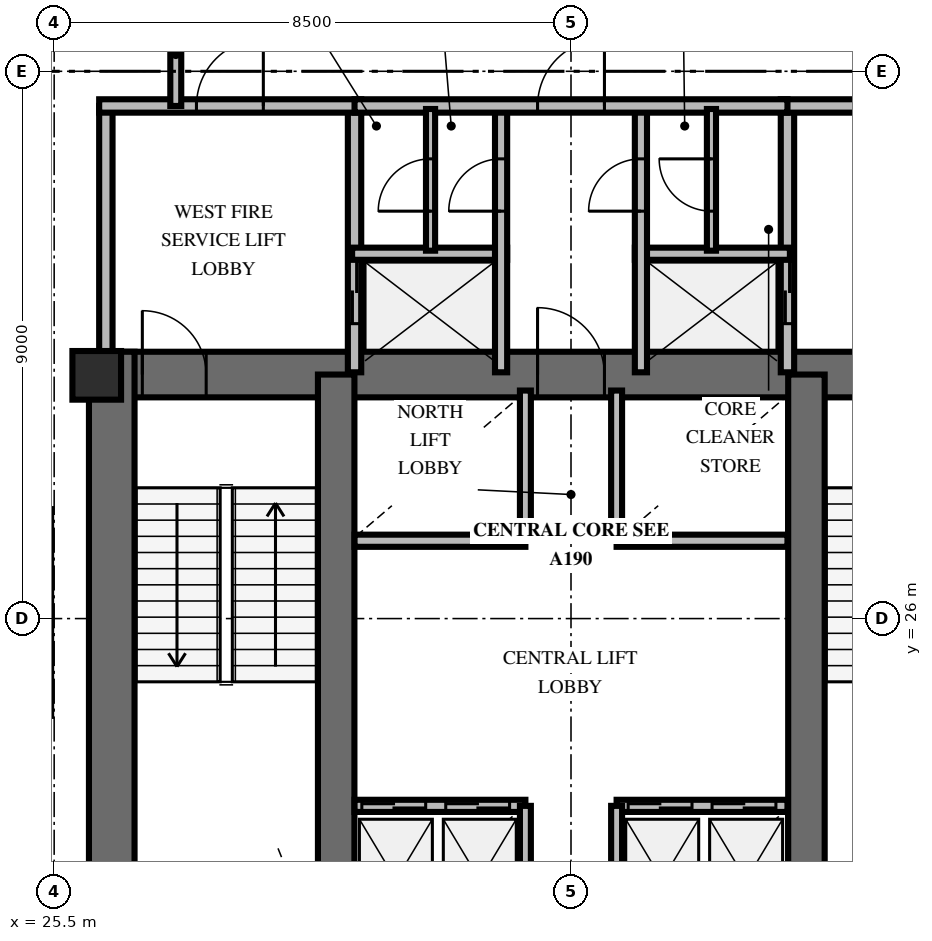
"""IFC4 building model, lengths in metres.
Left out: names, types, materials, properties, quantities, classifications, styles, units other than length and angle.
Written with IfcOpenShell. Run it as: python <this file> out.ifc"""

import sys

from ifc_helpers import new_model, si_unit, direction, frame, frame_2d, origin, origin_2d, place, context, subcontext, project, spatial, rectangle, extrude, element, fill, save


model = new_model("IFC4")
c1 = context("Model", 3, precision=1e-05, world=origin(), true_north=direction((0.0, 1.0)))
c2 = subcontext(c1, "Body", "Model", "MODEL_VIEW")
j1 = project(units=[si_unit("LENGTHUNIT", "METRE"), si_unit("PLANEANGLEUNIT", "RADIAN")], contexts=[c1])
p1 = place(None, origin())
s1 = spatial("IfcSite", under=j1, at=p1, CompositionType="ELEMENT")
p2 = place(p1, origin())
s2 = spatial("IfcBuilding", under=s1, at=p2, CompositionType="ELEMENT")
p3 = place(p2, frame((0.0, 0.0, 93.8)))
s3 = spatial("IfcBuildingStorey", under=s2, at=p3, CompositionType="ELEMENT", Elevation=93.8)
p4 = place(p3, frame((26.072, 30.013, 0.0), z_axis=(0.0, 0.0, 1.0), x_axis=(1.0, 0.0, 0.0)))
e1 = element("IfcWall", 1, at=p4, inside=s3, PredefinedType="SHEAR", context=c2, shape_type="SweptSolid", body=[
    extrude(rectangle(XDim=15.866, YDim=0.75, at=frame_2d((7.933, 0.0))), origin(), (0.0, 0.0, 1.0), 4.0),
])
p5 = place(p4, frame((0.878, 0.0, 0.0)))
e2 = element("IfcOpeningElement", 2, at=p5, cuts=e1, PredefinedType="OPENING", context=c2, shape_type="SweptSolid", body=[
    extrude(rectangle(XDim=1.05, YDim=2.15, at=frame_2d((0.525, 1.075))), frame((0.0, 0.385, 0.0), z_axis=(0.0, -1.0, 0.0), x_axis=(1.0, 0.0, 0.0)), (0.0, 0.0, 1.0), 0.77),
])
p6 = place(p4, frame((13.928, 0.0, 0.0)))
e3 = element("IfcOpeningElement", 3, at=p6, cuts=e1, PredefinedType="OPENING", context=c2, shape_type="SweptSolid", body=[
    extrude(rectangle(XDim=1.05, YDim=2.15, at=frame_2d((0.525, 1.075))), frame((0.0, 0.385, 0.0), z_axis=(0.0, -1.0, 0.0), x_axis=(1.0, 0.0, 0.0)), (0.0, 0.0, 1.0), 0.77),
])
p7 = place(p4, frame((7.378, 0.0, 0.0)))
e4 = element("IfcOpeningElement", 4, at=p7, cuts=e1, PredefinedType="OPENING", context=c2, shape_type="SweptSolid", body=[
    extrude(rectangle(XDim=1.1, YDim=2.15, at=frame_2d((0.55, 1.075))), frame((0.0, 0.385, 0.0), z_axis=(0.0, -1.0, 0.0), x_axis=(1.0, 0.0, 0.0)), (0.0, 0.0, 1.0), 0.77),
])
p8 = place(p3, frame((26.447, 19.812, 0.0), z_axis=(0.0, 0.0, 1.0), x_axis=(0.0, 1.0, 0.0)))
e5 = element("IfcWall", 5, at=p8, inside=s3, PredefinedType="SHEAR", context=c2, shape_type="SweptSolid", body=[
    extrude(rectangle(XDim=10.576, YDim=0.75, at=frame_2d((5.288, 0.0))), origin(), (0.0, 0.0, 1.0), 4.0),
])
for number, where, z_axis, x_axis in (
    (6, (30.138, 20.187, 0.0), (0.0, 0.0, 1.0), (0.0, 1.0, 0.0)),
    (7, (37.872, 20.187, 0.0), (0.0, 0.0, 1.0), (0.0, 1.0, 0.0)),
):
    element("IfcWall", number, at=place(p3, frame(where, z_axis=z_axis, x_axis=x_axis)), inside=s3, PredefinedType="SHEAR", context=c2, shape_type="SweptSolid", body=[
        extrude(rectangle(XDim=9.826, YDim=0.6, at=frame_2d((4.913, 0.0))), origin(), (0.0, 0.0, 1.0), 4.0),
    ])
p9 = place(p3, frame((26.2, 30.0, 0.0), z_axis=(0.0, 0.0, 1.0), x_axis=(1.0, 0.0, 0.0)))
e8 = element("IfcColumn", 8, at=p9, inside=s3, PredefinedType="PILASTER", context=c2, shape_type="SweptSolid", body=[
    extrude(rectangle(XDim=0.8, YDim=0.8, at=origin_2d()), origin(), (0.0, 0.0, 1.0), 4.0),
])
p10 = place(p3, frame((26.35, 30.05, 0.0), z_axis=(0.0, 0.0, 1.0), x_axis=(0.0, 1.0, 0.0)))
e9 = element("IfcWall", 9, at=p10, inside=s3, PredefinedType="SOLIDWALL", context=c2, shape_type="SweptSolid", body=[
    extrude(rectangle(XDim=4.38, YDim=0.22, at=frame_2d((2.19, 0.0))), origin(), (0.0, 0.0, 1.0), 2.8),
])
p11 = place(p3, frame((30.44, 30.05, 0.0), z_axis=(0.0, 0.0, 1.0), x_axis=(0.0, 1.0, 0.0)))
e10 = element("IfcWall", 10, at=p11, inside=s3, PredefinedType="SOLIDWALL", context=c2, shape_type="SweptSolid", body=[
    extrude(rectangle(XDim=4.38, YDim=0.22, at=frame_2d((2.19, 0.0))), origin(), (0.0, 0.0, 1.0), 2.8),
])
p12 = place(p11, frame((0.8, 0.0, 0.0)))
e11 = element("IfcOpeningElement", 11, at=p12, cuts=e10, PredefinedType="OPENING", context=c2, shape_type="SweptSolid", body=[
    extrude(rectangle(XDim=1.05, YDim=2.1, at=frame_2d((0.525, 1.05))), frame((0.0, 0.12, 0.0), z_axis=(0.0, -1.0, 0.0), x_axis=(1.0, 0.0, 0.0)), (0.0, 0.0, 1.0), 0.24),
])
p13 = place(p3, frame((26.24, 34.43, 0.0), z_axis=(0.0, 0.0, 1.0), x_axis=(1.0, 0.0, 0.0)))
e12 = element("IfcWall", 12, at=p13, inside=s3, PredefinedType="SOLIDWALL", context=c2, shape_type="SweptSolid", body=[
    extrude(rectangle(XDim=4.31, YDim=0.22, at=frame_2d((2.155, 0.0))), origin(), (0.0, 0.0, 1.0), 2.8),
])
p14 = place(p13, frame((1.6, 0.0, 0.0)))
e13 = element("IfcOpeningElement", 13, at=p14, cuts=e12, PredefinedType="OPENING", context=c2, shape_type="SweptSolid", body=[
    extrude(rectangle(XDim=1.1, YDim=2.15, at=frame_2d((0.55, 1.075))), frame((0.0, 0.12, 0.0), z_axis=(0.0, -1.0, 0.0), x_axis=(1.0, 0.0, 0.0)), (0.0, 0.0, 1.0), 0.24),
])
p15 = place(p3, frame((30.4, 32.0, 0.0), z_axis=(0.0, 0.0, 1.0), x_axis=(1.0, 0.0, 0.0)))
e14 = element("IfcWall", 14, at=p15, inside=s3, PredefinedType="SOLIDWALL", context=c2, shape_type="SweptSolid", body=[
    extrude(rectangle(XDim=2.55, YDim=0.2, at=frame_2d((1.275, 0.0))), origin(), (0.0, 0.0, 1.0), 2.8),
])
p16 = place(p3, frame((32.85, 30.05, 0.0), z_axis=(0.0, 0.0, 1.0), x_axis=(0.0, 1.0, 0.0)))
e15 = element("IfcWall", 15, at=p16, inside=s3, PredefinedType="SOLIDWALL", context=c2, shape_type="SweptSolid", body=[
    extrude(rectangle(XDim=4.38, YDim=0.2, at=frame_2d((2.19, 0.0))), origin(), (0.0, 0.0, 1.0), 2.8),
])
p17 = place(p16, frame((2.65, 0.0, 0.0)))
e16 = element("IfcOpeningElement", 16, at=p17, cuts=e15, PredefinedType="OPENING", context=c2, shape_type="SweptSolid", body=[
    extrude(rectangle(XDim=0.86, YDim=2.05, at=frame_2d((0.43, 1.025))), frame((0.0, 0.11, 0.0), z_axis=(0.0, -1.0, 0.0), x_axis=(1.0, 0.0, 0.0)), (0.0, 0.0, 1.0), 0.22),
])
p18 = place(p3, frame((37.56, 30.05, 0.0), z_axis=(0.0, 0.0, 1.0), x_axis=(0.0, 1.0, 0.0)))
e17 = element("IfcWall", 17, at=p18, inside=s3, PredefinedType="SOLIDWALL", context=c2, shape_type="SweptSolid", body=[
    extrude(rectangle(XDim=4.38, YDim=0.22, at=frame_2d((2.19, 0.0))), origin(), (0.0, 0.0, 1.0), 2.8),
])
p19 = place(p18, frame((0.8, 0.0, 0.0)))
e18 = element("IfcOpeningElement", 18, at=p19, cuts=e17, PredefinedType="OPENING", context=c2, shape_type="SweptSolid", body=[
    extrude(rectangle(XDim=1.05, YDim=2.1, at=frame_2d((0.525, 1.05))), frame((0.0, 0.12, 0.0), z_axis=(0.0, -1.0, 0.0), x_axis=(1.0, 0.0, 0.0)), (0.0, 0.0, 1.0), 0.24),
])
p20 = place(p3, frame((37.45, 34.43, 0.0), z_axis=(0.0, 0.0, 1.0), x_axis=(1.0, 0.0, 0.0)))
e19 = element("IfcWall", 19, at=p20, inside=s3, PredefinedType="SOLIDWALL", context=c2, shape_type="SweptSolid", body=[
    extrude(rectangle(XDim=4.31, YDim=0.22, at=frame_2d((2.155, 0.0))), origin(), (0.0, 0.0, 1.0), 2.8),
])
p21 = place(p20, frame((1.6, 0.0, 0.0)))
e20 = element("IfcOpeningElement", 20, at=p21, cuts=e19, PredefinedType="OPENING", context=c2, shape_type="SweptSolid", body=[
    extrude(rectangle(XDim=1.1, YDim=2.15, at=frame_2d((0.55, 1.075))), frame((0.0, 0.12, 0.0), z_axis=(0.0, -1.0, 0.0), x_axis=(1.0, 0.0, 0.0)), (0.0, 0.0, 1.0), 0.24),
])
p22 = place(p3, frame((35.05, 32.0, 0.0), z_axis=(0.0, 0.0, 1.0), x_axis=(1.0, 0.0, 0.0)))
e21 = element("IfcWall", 21, at=p22, inside=s3, PredefinedType="SOLIDWALL", context=c2, shape_type="SweptSolid", body=[
    extrude(rectangle(XDim=2.55, YDim=0.2, at=frame_2d((1.275, 0.0))), origin(), (0.0, 0.0, 1.0), 2.8),
])
p23 = place(p3, frame((35.15, 30.05, 0.0), z_axis=(0.0, 0.0, 1.0), x_axis=(0.0, 1.0, 0.0)))
e22 = element("IfcWall", 22, at=p23, inside=s3, PredefinedType="SOLIDWALL", context=c2, shape_type="SweptSolid", body=[
    extrude(rectangle(XDim=4.38, YDim=0.2, at=frame_2d((2.19, 0.0))), origin(), (0.0, 0.0, 1.0), 2.8),
])
p24 = place(p23, frame((2.65, 0.0, 0.0)))
e23 = element("IfcOpeningElement", 23, at=p24, cuts=e22, PredefinedType="OPENING", context=c2, shape_type="SweptSolid", body=[
    extrude(rectangle(XDim=0.86, YDim=2.05, at=frame_2d((0.43, 1.025))), frame((0.0, 0.11, 0.0), z_axis=(0.0, -1.0, 0.0), x_axis=(1.0, 0.0, 0.0)), (0.0, 0.0, 1.0), 0.22),
])
p25 = place(p3, frame((30.44, 34.43, 0.0), z_axis=(0.0, 0.0, 1.0), x_axis=(1.0, 0.0, 0.0)))
e24 = element("IfcWall", 24, at=p25, inside=s3, PredefinedType="SOLIDWALL", context=c2, shape_type="SweptSolid", body=[
    extrude(rectangle(XDim=7.12, YDim=0.22, at=frame_2d((3.56, 0.0))), origin(), (0.0, 0.0, 1.0), 2.8),
])
p26 = place(p25, frame((3.01, 0.0, 0.0)))
e25 = element("IfcOpeningElement", 25, at=p26, cuts=e24, PredefinedType="OPENING", context=c2, shape_type="SweptSolid", body=[
    extrude(rectangle(XDim=1.1, YDim=2.15, at=frame_2d((0.55, 1.075))), frame((0.0, 0.12, 0.0), z_axis=(0.0, -1.0, 0.0), x_axis=(1.0, 0.0, 0.0)), (0.0, 0.0, 1.0), 0.24),
])
p27 = place(p3, frame((31.69, 32.05, 0.0), z_axis=(0.0, 0.0, 1.0), x_axis=(0.0, 1.0, 0.0)))
e26 = element("IfcWall", 26, at=p27, inside=s3, PredefinedType="PARTITIONING", context=c2, shape_type="SweptSolid", body=[
    extrude(rectangle(XDim=2.33, YDim=0.15, at=frame_2d((1.165, 0.0))), origin(), (0.0, 0.0, 1.0), 2.8),
])
p28 = place(p27, frame((0.65, 0.0, 0.0)))
e27 = element("IfcOpeningElement", 27, at=p28, cuts=e26, PredefinedType="OPENING", context=c2, shape_type="SweptSolid", body=[
    extrude(rectangle(XDim=0.86, YDim=2.05, at=frame_2d((0.43, 1.025))), frame((0.0, 0.085, 0.0), z_axis=(0.0, -1.0, 0.0), x_axis=(1.0, 0.0, 0.0)), (0.0, 0.0, 1.0), 0.17),
])
p29 = place(p3, frame((36.31, 32.05, 0.0), z_axis=(0.0, 0.0, 1.0), x_axis=(0.0, 1.0, 0.0)))
e28 = element("IfcWall", 28, at=p29, inside=s3, PredefinedType="PARTITIONING", context=c2, shape_type="SweptSolid", body=[
    extrude(rectangle(XDim=2.33, YDim=0.15, at=frame_2d((1.165, 0.0))), origin(), (0.0, 0.0, 1.0), 2.8),
])
p30 = place(p29, frame((0.65, 0.0, 0.0)))
e29 = element("IfcOpeningElement", 29, at=p30, cuts=e28, PredefinedType="OPENING", context=c2, shape_type="SweptSolid", body=[
    extrude(rectangle(XDim=0.86, YDim=2.05, at=frame_2d((0.43, 1.025))), frame((0.0, 0.085, 0.0), z_axis=(0.0, -1.0, 0.0), x_axis=(1.0, 0.0, 0.0)), (0.0, 0.0, 1.0), 0.17),
])
p31 = place(p3, frame((30.44, 22.92, 0.0), z_axis=(0.0, 0.0, 1.0), x_axis=(1.0, 0.0, 0.0)))
e30 = element("IfcWall", 30, at=p31, inside=s3, PredefinedType="SOLIDWALL", context=c2, shape_type="SweptSolid", body=[
    extrude(rectangle(XDim=2.81, YDim=0.2, at=frame_2d((1.405, 0.0))), origin(), (0.0, 0.0, 1.0), 2.8),
])
p32 = place(p31, frame((0.12, 0.0, 0.0)))
e31 = element("IfcOpeningElement", 31, at=p32, cuts=e30, PredefinedType="OPENING", context=c2, shape_type="SweptSolid", body=[
    extrude(rectangle(XDim=1.05, YDim=2.1, at=frame_2d((0.525, 1.05))), frame((0.0, 0.11, 0.0), z_axis=(0.0, -1.0, 0.0), x_axis=(1.0, 0.0, 0.0)), (0.0, 0.0, 1.0), 0.22),
])
p33 = place(p31, frame((1.5, 0.0, 0.0)))
e32 = element("IfcOpeningElement", 32, at=p33, cuts=e30, PredefinedType="OPENING", context=c2, shape_type="SweptSolid", body=[
    extrude(rectangle(XDim=1.05, YDim=2.1, at=frame_2d((0.525, 1.05))), frame((0.0, 0.11, 0.0), z_axis=(0.0, -1.0, 0.0), x_axis=(1.0, 0.0, 0.0)), (0.0, 0.0, 1.0), 0.22),
])
p34 = place(p3, frame((33.25, 20.5, 0.0), z_axis=(0.0, 0.0, 1.0), x_axis=(0.0, 1.0, 0.0)))
e33 = element("IfcWall", 33, at=p34, inside=s3, PredefinedType="SOLIDWALL", context=c2, shape_type="SweptSolid", body=[
    extrude(rectangle(XDim=2.42, YDim=0.18, at=frame_2d((1.21, 0.0))), origin(), (0.0, 0.0, 1.0), 2.8),
])
p35 = place(p3, frame((34.75, 22.92, 0.0), z_axis=(0.0, 0.0, 1.0), x_axis=(1.0, 0.0, 0.0)))
e34 = element("IfcWall", 34, at=p35, inside=s3, PredefinedType="SOLIDWALL", context=c2, shape_type="SweptSolid", body=[
    extrude(rectangle(XDim=2.81, YDim=0.2, at=frame_2d((1.405, 0.0))), origin(), (0.0, 0.0, 1.0), 2.8),
])
p36 = place(p35, frame((0.19, 0.0, 0.0)))
e35 = element("IfcOpeningElement", 35, at=p36, cuts=e34, PredefinedType="OPENING", context=c2, shape_type="SweptSolid", body=[
    extrude(rectangle(XDim=1.05, YDim=2.1, at=frame_2d((0.525, 1.05))), frame((0.0, 0.11, 0.0), z_axis=(0.0, -1.0, 0.0), x_axis=(1.0, 0.0, 0.0)), (0.0, 0.0, 1.0), 0.22),
])
p37 = place(p35, frame((1.57, 0.0, 0.0)))
e36 = element("IfcOpeningElement", 36, at=p37, cuts=e34, PredefinedType="OPENING", context=c2, shape_type="SweptSolid", body=[
    extrude(rectangle(XDim=1.05, YDim=2.1, at=frame_2d((0.525, 1.05))), frame((0.0, 0.11, 0.0), z_axis=(0.0, -1.0, 0.0), x_axis=(1.0, 0.0, 0.0)), (0.0, 0.0, 1.0), 0.22),
])
p38 = place(p3, frame((34.75, 20.5, 0.0), z_axis=(0.0, 0.0, 1.0), x_axis=(0.0, 1.0, 0.0)))
e37 = element("IfcWall", 37, at=p38, inside=s3, PredefinedType="SOLIDWALL", context=c2, shape_type="SweptSolid", body=[
    extrude(rectangle(XDim=2.42, YDim=0.18, at=frame_2d((1.21, 0.0))), origin(), (0.0, 0.0, 1.0), 2.8),
])
p39 = place(p3, frame((30.44, 27.28, 0.0), z_axis=(0.0, 0.0, 1.0), x_axis=(1.0, 0.0, 0.0)))
e38 = element("IfcWall", 38, at=p39, inside=s3, PredefinedType="SOLIDWALL", context=c2, shape_type="SweptSolid", body=[
    extrude(rectangle(XDim=2.81, YDim=0.2, at=frame_2d((1.405, 0.0))), origin(), (0.0, 0.0, 1.0), 2.8),
])
p40 = place(p3, frame((33.25, 27.28, 0.0), z_axis=(0.0, 0.0, 1.0), x_axis=(0.0, 1.0, 0.0)))
e39 = element("IfcWall", 39, at=p40, inside=s3, PredefinedType="SOLIDWALL", context=c2, shape_type="SweptSolid", body=[
    extrude(rectangle(XDim=2.47, YDim=0.18, at=frame_2d((1.235, 0.0))), origin(), (0.0, 0.0, 1.0), 2.8),
])
p41 = place(p3, frame((34.75, 27.28, 0.0), z_axis=(0.0, 0.0, 1.0), x_axis=(1.0, 0.0, 0.0)))
e40 = element("IfcWall", 40, at=p41, inside=s3, PredefinedType="SOLIDWALL", context=c2, shape_type="SweptSolid", body=[
    extrude(rectangle(XDim=2.81, YDim=0.2, at=frame_2d((1.405, 0.0))), origin(), (0.0, 0.0, 1.0), 2.8),
])
p42 = place(p3, frame((34.75, 27.28, 0.0), z_axis=(0.0, 0.0, 1.0), x_axis=(0.0, 1.0, 0.0)))
e41 = element("IfcWall", 41, at=p42, inside=s3, PredefinedType="SOLIDWALL", context=c2, shape_type="SweptSolid", body=[
    extrude(rectangle(XDim=2.47, YDim=0.18, at=frame_2d((1.235, 0.0))), origin(), (0.0, 0.0, 1.0), 2.8),
])
p43 = place(p3, frame((27.5, 34.43, 0.0), z_axis=(0.0, 0.0, 1.0), x_axis=(0.0, 1.0, 0.0)))
e42 = element("IfcWall", 42, at=p43, inside=s3, PredefinedType="PARTITIONING", context=c2, shape_type="SweptSolid", body=[
    extrude(rectangle(XDim=1.693, YDim=0.18, at=frame_2d((0.846, 0.0))), origin(), (0.0, 0.0, 1.0), 2.8),
])
p44 = place(p5, origin())
e43 = element("IfcDoor", 43, at=p44, inside=s3, OperationType="SINGLE_SWING_LEFT", PredefinedType="DOOR", context=c2, shape_type="SweptSolid", body=[
    extrude(rectangle(XDim=1.05, YDim=2.15, at=frame_2d((0.525, 1.075))), frame((0.0, 0.025, 0.0), z_axis=(0.0, -1.0, 0.0), x_axis=(1.0, 0.0, 0.0)), (0.0, 0.0, 1.0), 0.05),
])
fill(e2, e43)
p45 = place(p7, origin())
e44 = element("IfcDoor", 44, at=p45, inside=s3, OperationType="SINGLE_SWING_LEFT", PredefinedType="DOOR", context=c2, shape_type="SweptSolid", body=[
    extrude(rectangle(XDim=1.1, YDim=2.15, at=frame_2d((0.55, 1.075))), frame((0.0, 0.025, 0.0), z_axis=(0.0, -1.0, 0.0), x_axis=(1.0, 0.0, 0.0)), (0.0, 0.0, 1.0), 0.05),
])
fill(e4, e44)
p46 = place(p14, origin())
e45 = element("IfcDoor", 45, at=p46, inside=s3, OperationType="SINGLE_SWING_RIGHT", PredefinedType="DOOR", context=c2, shape_type="SweptSolid", body=[
    extrude(rectangle(XDim=1.1, YDim=2.15, at=frame_2d((0.55, 1.075))), frame((0.0, 0.025, 0.0), z_axis=(0.0, -1.0, 0.0), x_axis=(1.0, 0.0, 0.0)), (0.0, 0.0, 1.0), 0.05),
])
fill(e13, e45)
p47 = place(p12, origin())
e46 = element("IfcDoor", 46, at=p47, inside=s3, OperationType="DOUBLE_DOOR_SLIDING", PredefinedType="USERDEFINED", context=c2, shape_type="SweptSolid", body=[
    extrude(rectangle(XDim=1.05, YDim=2.1, at=frame_2d((0.525, 1.05))), frame((0.0, 0.025, 0.0), z_axis=(0.0, -1.0, 0.0), x_axis=(1.0, 0.0, 0.0)), (0.0, 0.0, 1.0), 0.05),
])
fill(e11, e46)
p48 = place(p17, origin())
e47 = element("IfcDoor", 47, at=p48, inside=s3, OperationType="SINGLE_SWING_LEFT", PredefinedType="TRAPDOOR", context=c2, shape_type="SweptSolid", body=[
    extrude(rectangle(XDim=0.86, YDim=2.05, at=frame_2d((0.43, 1.025))), frame((0.0, 0.025, 0.0), z_axis=(0.0, -1.0, 0.0), x_axis=(1.0, 0.0, 0.0)), (0.0, 0.0, 1.0), 0.05),
])
fill(e16, e47)
p49 = place(p19, origin())
e48 = element("IfcDoor", 48, at=p49, inside=s3, OperationType="DOUBLE_DOOR_SLIDING", PredefinedType="USERDEFINED", context=c2, shape_type="SweptSolid", body=[
    extrude(rectangle(XDim=1.05, YDim=2.1, at=frame_2d((0.525, 1.05))), frame((0.0, 0.025, 0.0), z_axis=(0.0, -1.0, 0.0), x_axis=(1.0, 0.0, 0.0)), (0.0, 0.0, 1.0), 0.05),
])
fill(e18, e48)
p50 = place(p24, origin())
e49 = element("IfcDoor", 49, at=p50, inside=s3, OperationType="SINGLE_SWING_LEFT", PredefinedType="TRAPDOOR", context=c2, shape_type="SweptSolid", body=[
    extrude(rectangle(XDim=0.86, YDim=2.05, at=frame_2d((0.43, 1.025))), frame((0.0, 0.025, 0.0), z_axis=(0.0, -1.0, 0.0), x_axis=(1.0, 0.0, 0.0)), (0.0, 0.0, 1.0), 0.05),
])
fill(e23, e49)
p51 = place(p26, origin())
e50 = element("IfcDoor", 50, at=p51, inside=s3, OperationType="SINGLE_SWING_RIGHT", PredefinedType="DOOR", context=c2, shape_type="SweptSolid", body=[
    extrude(rectangle(XDim=1.1, YDim=2.15, at=frame_2d((0.55, 1.075))), frame((0.0, 0.025, 0.0), z_axis=(0.0, -1.0, 0.0), x_axis=(1.0, 0.0, 0.0)), (0.0, 0.0, 1.0), 0.05),
])
fill(e25, e50)
p52 = place(p28, origin())
e51 = element("IfcDoor", 51, at=p52, inside=s3, OperationType="SINGLE_SWING_LEFT", PredefinedType="TRAPDOOR", context=c2, shape_type="SweptSolid", body=[
    extrude(rectangle(XDim=0.86, YDim=2.05, at=frame_2d((0.43, 1.025))), frame((0.0, 0.025, 0.0), z_axis=(0.0, -1.0, 0.0), x_axis=(1.0, 0.0, 0.0)), (0.0, 0.0, 1.0), 0.05),
])
fill(e27, e51)
p53 = place(p30, origin())
e52 = element("IfcDoor", 52, at=p53, inside=s3, OperationType="SINGLE_SWING_RIGHT", PredefinedType="TRAPDOOR", context=c2, shape_type="SweptSolid", body=[
    extrude(rectangle(XDim=0.86, YDim=2.05, at=frame_2d((0.43, 1.025))), frame((0.0, 0.025, 0.0), z_axis=(0.0, -1.0, 0.0), x_axis=(1.0, 0.0, 0.0)), (0.0, 0.0, 1.0), 0.05),
])
fill(e29, e52)
p54 = place(p32, origin())
e53 = element("IfcDoor", 53, at=p54, inside=s3, OperationType="DOUBLE_DOOR_SLIDING", PredefinedType="USERDEFINED", context=c2, shape_type="SweptSolid", body=[
    extrude(rectangle(XDim=1.05, YDim=2.1, at=frame_2d((0.525, 1.05))), frame((0.0, 0.025, 0.0), z_axis=(0.0, -1.0, 0.0), x_axis=(1.0, 0.0, 0.0)), (0.0, 0.0, 1.0), 0.05),
])
fill(e31, e53)
p55 = place(p33, origin())
e54 = element("IfcDoor", 54, at=p55, inside=s3, OperationType="DOUBLE_DOOR_SLIDING", PredefinedType="USERDEFINED", context=c2, shape_type="SweptSolid", body=[
    extrude(rectangle(XDim=1.05, YDim=2.1, at=frame_2d((0.525, 1.05))), frame((0.0, 0.025, 0.0), z_axis=(0.0, -1.0, 0.0), x_axis=(1.0, 0.0, 0.0)), (0.0, 0.0, 1.0), 0.05),
])
fill(e32, e54)
p56 = place(p36, origin())
e55 = element("IfcDoor", 55, at=p56, inside=s3, OperationType="DOUBLE_DOOR_SLIDING", PredefinedType="USERDEFINED", context=c2, shape_type="SweptSolid", body=[
    extrude(rectangle(XDim=1.05, YDim=2.1, at=frame_2d((0.525, 1.05))), frame((0.0, 0.025, 0.0), z_axis=(0.0, -1.0, 0.0), x_axis=(1.0, 0.0, 0.0)), (0.0, 0.0, 1.0), 0.05),
])
fill(e35, e55)
p57 = place(p37, origin())
e56 = element("IfcDoor", 56, at=p57, inside=s3, OperationType="DOUBLE_DOOR_SLIDING", PredefinedType="USERDEFINED", context=c2, shape_type="SweptSolid", body=[
    extrude(rectangle(XDim=1.05, YDim=2.1, at=frame_2d((0.525, 1.05))), frame((0.0, 0.025, 0.0), z_axis=(0.0, -1.0, 0.0), x_axis=(1.0, 0.0, 0.0)), (0.0, 0.0, 1.0), 0.05),
])
fill(e36, e56)
save(model, sys.argv[1])
